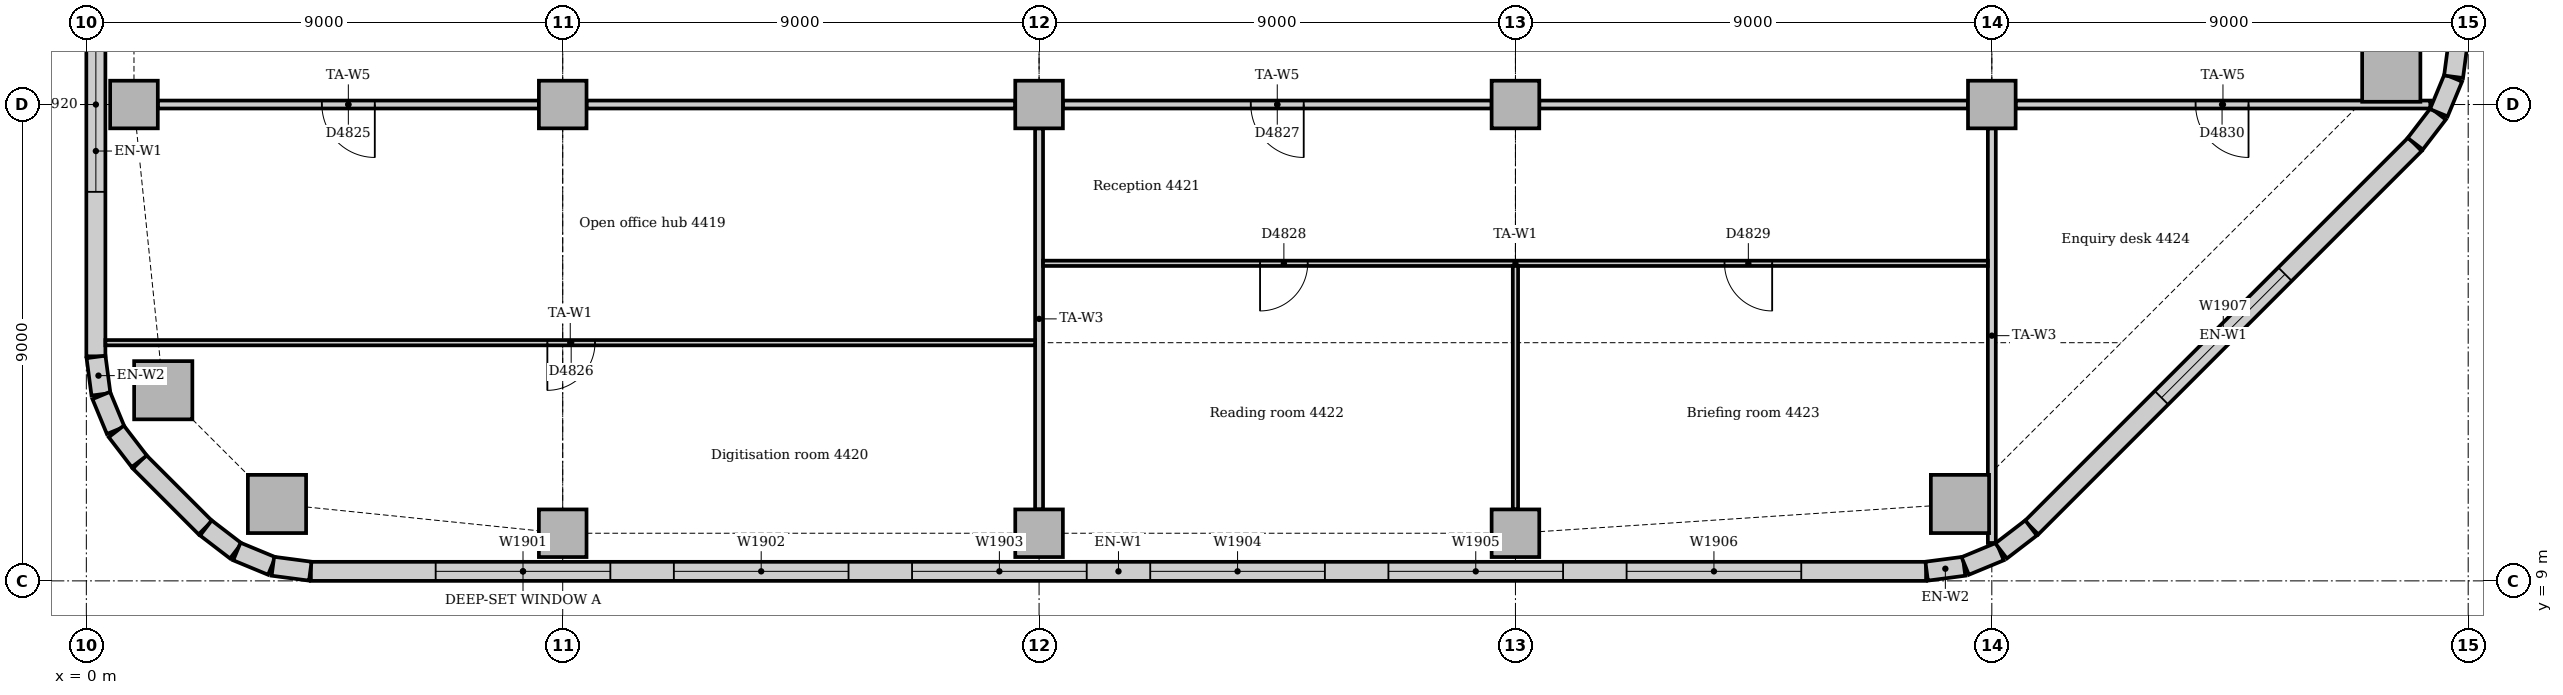
"""IFC4 building model, lengths in metres.
Left out: names, types, materials, properties, quantities, classifications, styles, units other than length and angle.
Written with IfcOpenShell. Run it as: python <this file> out.ifc"""

import sys

from ifc_helpers import new_model, si_unit, direction, frame, frame_2d, origin, origin_2d, place, context, subcontext, project, spatial, rectangle, extrude, element, fill, save


model = new_model("IFC4")
c1 = context("Model", 3, precision=1e-05, world=origin(), true_north=direction((0.0, 1.0)))
c2 = subcontext(c1, "Body", "Model", "MODEL_VIEW")
j1 = project(units=[si_unit("LENGTHUNIT", "METRE"), si_unit("PLANEANGLEUNIT", "RADIAN")], contexts=[c1])
p1 = place(None, origin())
s1 = spatial("IfcSite", under=j1, at=p1, CompositionType="ELEMENT")
p2 = place(p1, origin())
s2 = spatial("IfcBuilding", under=s1, at=p2, CompositionType="ELEMENT")
p3 = place(p2, frame((0.0, 0.0, 185.0)))
s3 = spatial("IfcBuildingStorey", under=s2, at=p3, CompositionType="ELEMENT", Elevation=185.0)
for number, where, z_axis, x_axis in (
    (1, (3.602, 10.453, 0.0), (0.0, 0.0, 1.0), (1.0, 0.0, 0.0)),
    (2, (35.398, 10.453, 0.0), (0.0, 0.0, 1.0), (1.0, 0.0, 0.0)),
    (3, (43.547, 18.602, 0.0), (0.0, 0.0, 1.0), (1.0, 0.0, 0.0)),
    (4, (1.453, 12.602, 0.0), (0.0, 0.0, 1.0), (1.0, 0.0, 0.0)),
):
    element("IfcColumn", number, at=place(p3, frame(where, z_axis=z_axis, x_axis=x_axis)), inside=s3, PredefinedType="COLUMN", context=c2, shape_type="SweptSolid", body=[
        extrude(rectangle(XDim=1.1, YDim=1.1, at=origin_2d()), origin(), (0.0, 0.0, 1.0), 3.85),
    ])
for number, where, z_axis, x_axis in (
    (5, (9.0, 9.9, 0.0), (0.0, 0.0, 1.0), (1.0, 0.0, 0.0)),
    (6, (18.0, 9.9, 0.0), (0.0, 0.0, 1.0), (1.0, 0.0, 0.0)),
    (7, (27.0, 9.9, 0.0), (0.0, 0.0, 1.0), (1.0, 0.0, 0.0)),
    (8, (0.9, 18.0, 0.0), (0.0, 0.0, 1.0), (1.0, 0.0, 0.0)),
    (9, (9.0, 18.0, 0.0), (0.0, 0.0, 1.0), (1.0, 0.0, 0.0)),
    (10, (18.0, 18.0, 0.0), (0.0, 0.0, 1.0), (1.0, 0.0, 0.0)),
    (11, (27.0, 18.0, 0.0), (0.0, 0.0, 1.0), (1.0, 0.0, 0.0)),
    (12, (36.0, 18.0, 0.0), (0.0, 0.0, 1.0), (1.0, 0.0, 0.0)),
):
    element("IfcColumn", number, at=place(p3, frame(where, z_axis=z_axis, x_axis=x_axis)), inside=s3, PredefinedType="COLUMN", context=c2, shape_type="SweptSolid", body=[
        extrude(rectangle(XDim=0.9, YDim=0.9, at=origin_2d()), origin(), (0.0, 0.0, 1.0), 3.85),
    ])
p4 = place(p3, frame((4.243, 9.18, 0.0), z_axis=(0.0, 0.0, 1.0), x_axis=(1.0, 0.0, 0.0)))
e13 = element("IfcWall", 13, at=p4, inside=s3, PredefinedType="STANDARD", context=c2, shape_type="SweptSolid", body=[
    extrude(rectangle(XDim=30.515, YDim=0.36, at=frame_2d((15.257, 0.0))), origin(), (0.0, 0.0, 1.0), 3.85),
])
p5 = place(p4, frame((2.357, 0.0, 0.9)))
e14 = element("IfcOpeningElement", 14, at=p5, cuts=e13, PredefinedType="OPENING", context=c2, shape_type="SweptSolid", body=[
    extrude(rectangle(XDim=3.3, YDim=1.6, at=frame_2d((1.65, 0.8))), frame((0.0, 0.19, 0.0), z_axis=(0.0, -1.0, 0.0), x_axis=(1.0, 0.0, 0.0)), (0.0, 0.0, 1.0), 0.38),
])
p6 = place(p4, frame((6.857, 0.0, 0.9)))
e15 = element("IfcOpeningElement", 15, at=p6, cuts=e13, PredefinedType="OPENING", context=c2, shape_type="SweptSolid", body=[
    extrude(rectangle(XDim=3.3, YDim=1.6, at=frame_2d((1.65, 0.8))), frame((0.0, 0.19, 0.0), z_axis=(0.0, -1.0, 0.0), x_axis=(1.0, 0.0, 0.0)), (0.0, 0.0, 1.0), 0.38),
])
p7 = place(p4, frame((11.357, 0.0, 0.9)))
e16 = element("IfcOpeningElement", 16, at=p7, cuts=e13, PredefinedType="OPENING", context=c2, shape_type="SweptSolid", body=[
    extrude(rectangle(XDim=3.3, YDim=1.6, at=frame_2d((1.65, 0.8))), frame((0.0, 0.19, 0.0), z_axis=(0.0, -1.0, 0.0), x_axis=(1.0, 0.0, 0.0)), (0.0, 0.0, 1.0), 0.38),
])
p8 = place(p4, frame((15.857, 0.0, 0.9)))
e17 = element("IfcOpeningElement", 17, at=p8, cuts=e13, PredefinedType="OPENING", context=c2, shape_type="SweptSolid", body=[
    extrude(rectangle(XDim=3.3, YDim=1.6, at=frame_2d((1.65, 0.8))), frame((0.0, 0.19, 0.0), z_axis=(0.0, -1.0, 0.0), x_axis=(1.0, 0.0, 0.0)), (0.0, 0.0, 1.0), 0.38),
])
p9 = place(p4, frame((20.357, 0.0, 0.9)))
e18 = element("IfcOpeningElement", 18, at=p9, cuts=e13, PredefinedType="OPENING", context=c2, shape_type="SweptSolid", body=[
    extrude(rectangle(XDim=3.3, YDim=1.6, at=frame_2d((1.65, 0.8))), frame((0.0, 0.19, 0.0), z_axis=(0.0, -1.0, 0.0), x_axis=(1.0, 0.0, 0.0)), (0.0, 0.0, 1.0), 0.38),
])
p10 = place(p4, frame((24.857, 0.0, 0.9)))
e19 = element("IfcOpeningElement", 19, at=p10, cuts=e13, PredefinedType="OPENING", context=c2, shape_type="SweptSolid", body=[
    extrude(rectangle(XDim=3.3, YDim=1.6, at=frame_2d((1.65, 0.8))), frame((0.0, 0.19, 0.0), z_axis=(0.0, -1.0, 0.0), x_axis=(1.0, 0.0, 0.0)), (0.0, 0.0, 1.0), 0.38),
])
p11 = place(p3, frame((36.751, 10.006, 0.0), z_axis=(0.0, 0.0, 1.0), x_axis=(0.707106781187, 0.707106781187, 0.0)))
e20 = element("IfcWall", 20, at=p11, inside=s3, PredefinedType="STANDARD", context=c2, shape_type="SweptSolid", body=[
    extrude(rectangle(XDim=10.243, YDim=0.36, at=frame_2d((5.121, 0.0))), origin(), (0.0, 0.0, 1.0), 3.85),
])
p12 = place(p11, frame((3.471, 0.0, 0.9)))
e21 = element("IfcOpeningElement", 21, at=p12, cuts=e20, PredefinedType="OPENING", context=c2, shape_type="SweptSolid", body=[
    extrude(rectangle(XDim=3.3, YDim=1.6, at=frame_2d((1.65, 0.8))), frame((0.0, 0.19, 0.0), z_axis=(0.0, -1.0, 0.0), x_axis=(1.0, 0.0, 0.0)), (0.0, 0.0, 1.0), 0.38),
])
p13 = place(p3, frame((0.18, 21.0, 0.0), z_axis=(0.0, 0.0, 1.0), x_axis=(0.0, -1.0, 0.0)))
e22 = element("IfcWall", 22, at=p13, inside=s3, PredefinedType="STANDARD", context=c2, shape_type="SweptSolid", body=[
    extrude(rectangle(XDim=7.757, YDim=0.36, at=frame_2d((3.879, 0.0))), origin(), (0.0, 0.0, 1.0), 3.85),
])
p14 = place(p13, frame((1.35, 0.0, 0.9)))
e23 = element("IfcOpeningElement", 23, at=p14, cuts=e22, PredefinedType="OPENING", context=c2, shape_type="SweptSolid", body=[
    extrude(rectangle(XDim=3.3, YDim=1.6, at=frame_2d((1.65, 0.8))), frame((0.0, 0.19, 0.0), z_axis=(0.0, -1.0, 0.0), x_axis=(1.0, 0.0, 0.0)), (0.0, 0.0, 1.0), 0.38),
])
p15 = place(p3, frame((1.006, 11.249, 0.0), z_axis=(0.0, 0.0, 1.0), x_axis=(0.707106781187, -0.707106781187, 0.0)))
e24 = element("IfcWall", 24, at=p15, inside=s3, PredefinedType="STANDARD", context=c2, shape_type="SweptSolid", body=[
    extrude(rectangle(XDim=1.757, YDim=0.36, at=frame_2d((0.879, 0.0))), origin(), (0.0, 0.0, 1.0), 3.85),
])
for number, where, z_axis, x_axis in (
    (25, (34.769, 9.183, 0.0), (0.0, 0.0, 1.0), (0.991, 0.131, 0.0)),
    (26, (35.497, 9.282, 0.0), (0.0, 0.0, 1.0), (0.924, 0.383, 0.0)),
):
    element("IfcWall", number, at=place(p3, frame(where, z_axis=z_axis, x_axis=x_axis)), inside=s3, PredefinedType="STANDARD", context=c2, shape_type="SweptSolid", body=[
        extrude(rectangle(XDim=0.713, YDim=0.36, at=frame_2d((0.356, 0.0))), origin(), (0.0, 0.0, 1.0), 3.85),
    ])
for number, where, z_axis, x_axis in (
    (27, (36.175, 9.566, 0.0), (0.0, 0.0, 1.0), (0.793, 0.609, 0.0)),
    (28, (44.0, 17.259, 0.0), (0.0, 0.0, 1.0), (0.609, 0.793, 0.0)),
):
    element("IfcWall", number, at=place(p3, frame(where, z_axis=z_axis, x_axis=x_axis)), inside=s3, PredefinedType="STANDARD", context=c2, shape_type="SweptSolid", body=[
        extrude(rectangle(XDim=0.713, YDim=0.36, at=frame_2d((0.357, 0.0))), origin(), (0.0, 0.0, 1.0), 3.85),
    ])
for number, where, z_axis, x_axis in (
    (29, (44.445, 17.844, 0.0), (0.0, 0.0, 1.0), (0.383, 0.924, 0.0)),
    (30, (44.724, 18.524, 0.0), (0.0, 0.0, 1.0), (0.131, 0.991, 0.0)),
    (31, (0.183, 13.231, 0.0), (0.0, 0.0, 1.0), (0.131, -0.991, 0.0)),
    (32, (0.282, 12.503, 0.0), (0.0, 0.0, 1.0), (0.383, -0.924, 0.0)),
):
    element("IfcWall", number, at=place(p3, frame(where, z_axis=z_axis, x_axis=x_axis)), inside=s3, PredefinedType="STANDARD", context=c2, shape_type="SweptSolid", body=[
        extrude(rectangle(XDim=0.713, YDim=0.36, at=frame_2d((0.356, 0.0))), origin(), (0.0, 0.0, 1.0), 3.85),
    ])
for number, where, z_axis, x_axis in (
    (33, (0.566, 11.825, 0.0), (0.0, 0.0, 1.0), (0.609, -0.793, 0.0)),
    (34, (2.259, 10.0, 0.0), (0.0, 0.0, 1.0), (0.793, -0.609, 0.0)),
):
    element("IfcWall", number, at=place(p3, frame(where, z_axis=z_axis, x_axis=x_axis)), inside=s3, PredefinedType="STANDARD", context=c2, shape_type="SweptSolid", body=[
        extrude(rectangle(XDim=0.713, YDim=0.36, at=frame_2d((0.357, 0.0))), origin(), (0.0, 0.0, 1.0), 3.85),
    ])
for number, where, z_axis, x_axis in (
    (35, (2.844, 9.555, 0.0), (0.0, 0.0, 1.0), (0.924, -0.383, 0.0)),
    (36, (3.524, 9.276, 0.0), (0.0, 0.0, 1.0), (0.991, -0.131, 0.0)),
):
    element("IfcWall", number, at=place(p3, frame(where, z_axis=z_axis, x_axis=x_axis)), inside=s3, PredefinedType="STANDARD", context=c2, shape_type="SweptSolid", body=[
        extrude(rectangle(XDim=0.713, YDim=0.36, at=frame_2d((0.356, 0.0))), origin(), (0.0, 0.0, 1.0), 3.85),
    ])
p16 = place(p3, frame((1.35, 18.0, 0.0), z_axis=(0.0, 0.0, 1.0), x_axis=(1.0, 0.0, 0.0)))
e37 = element("IfcWall", 37, at=p16, inside=s3, PredefinedType="PARTITIONING", context=c2, shape_type="SweptSolid", body=[
    extrude(rectangle(XDim=7.2, YDim=0.15, at=frame_2d((3.6, 0.0))), origin(), (0.0, 0.0, 1.0), 3.262),
])
p17 = place(p16, frame((3.1, 0.0, 0.0)))
e38 = element("IfcOpeningElement", 38, at=p17, cuts=e37, PredefinedType="OPENING", context=c2, shape_type="SweptSolid", body=[
    extrude(rectangle(XDim=1.0, YDim=2.1, at=frame_2d((0.5, 1.05))), frame((0.0, 0.085, 0.0), z_axis=(0.0, -1.0, 0.0), x_axis=(1.0, 0.0, 0.0)), (0.0, 0.0, 1.0), 0.17),
])
p18 = place(p3, frame((9.45, 18.0, 0.0), z_axis=(0.0, 0.0, 1.0), x_axis=(1.0, 0.0, 0.0)))
e39 = element("IfcWall", 39, at=p18, inside=s3, PredefinedType="PARTITIONING", context=c2, shape_type="SweptSolid", body=[
    extrude(rectangle(XDim=8.1, YDim=0.15, at=frame_2d((4.05, 0.0))), origin(), (0.0, 0.0, 1.0), 3.262),
])
p19 = place(p3, frame((18.45, 18.0, 0.0), z_axis=(0.0, 0.0, 1.0), x_axis=(1.0, 0.0, 0.0)))
e40 = element("IfcWall", 40, at=p19, inside=s3, PredefinedType="PARTITIONING", context=c2, shape_type="SweptSolid", body=[
    extrude(rectangle(XDim=8.1, YDim=0.15, at=frame_2d((4.05, 0.0))), origin(), (0.0, 0.0, 1.0), 3.262),
])
p20 = place(p19, frame((3.55, 0.0, 0.0)))
e41 = element("IfcOpeningElement", 41, at=p20, cuts=e40, PredefinedType="OPENING", context=c2, shape_type="SweptSolid", body=[
    extrude(rectangle(XDim=1.0, YDim=2.1, at=frame_2d((0.5, 1.05))), frame((0.0, 0.085, 0.0), z_axis=(0.0, -1.0, 0.0), x_axis=(1.0, 0.0, 0.0)), (0.0, 0.0, 1.0), 0.17),
])
p21 = place(p3, frame((27.45, 18.0, 0.0), z_axis=(0.0, 0.0, 1.0), x_axis=(1.0, 0.0, 0.0)))
e42 = element("IfcWall", 42, at=p21, inside=s3, PredefinedType="PARTITIONING", context=c2, shape_type="SweptSolid", body=[
    extrude(rectangle(XDim=8.1, YDim=0.15, at=frame_2d((4.05, 0.0))), origin(), (0.0, 0.0, 1.0), 3.262),
])
p22 = place(p3, frame((36.45, 18.0, 0.0), z_axis=(0.0, 0.0, 1.0), x_axis=(1.0, 0.0, 0.0)))
e43 = element("IfcWall", 43, at=p22, inside=s3, PredefinedType="PARTITIONING", context=c2, shape_type="SweptSolid", body=[
    extrude(rectangle(XDim=7.834, YDim=0.15, at=frame_2d((3.917, 0.0))), origin(), (0.0, 0.0, 1.0), 3.35),
])
p23 = place(p22, frame((3.4, 0.0, 0.0)))
e44 = element("IfcOpeningElement", 44, at=p23, cuts=e43, PredefinedType="OPENING", context=c2, shape_type="SweptSolid", body=[
    extrude(rectangle(XDim=1.0, YDim=2.1, at=frame_2d((0.5, 1.05))), frame((0.0, 0.085, 0.0), z_axis=(0.0, -1.0, 0.0), x_axis=(1.0, 0.0, 0.0)), (0.0, 0.0, 1.0), 0.17),
])
p24 = place(p3, frame((18.0, 10.35, 0.0), z_axis=(0.0, 0.0, 1.0), x_axis=(0.0, 1.0, 0.0)))
e45 = element("IfcWall", 45, at=p24, inside=s3, PredefinedType="PARTITIONING", context=c2, shape_type="SweptSolid", body=[
    extrude(rectangle(XDim=7.2, YDim=0.15, at=frame_2d((3.6, 0.0))), origin(), (0.0, 0.0, 1.0), 3.362),
])
p25 = place(p3, frame((36.0, 9.716, 0.0), z_axis=(0.0, 0.0, 1.0), x_axis=(0.0, 1.0, 0.0)))
e46 = element("IfcWall", 46, at=p25, inside=s3, PredefinedType="PARTITIONING", context=c2, shape_type="SweptSolid", body=[
    extrude(rectangle(XDim=7.834, YDim=0.15, at=frame_2d((3.917, 0.0))), origin(), (0.0, 0.0, 1.0), 3.35),
])
p26 = place(p3, frame((18.075, 15.0, 0.0), z_axis=(0.0, 0.0, 1.0), x_axis=(1.0, 0.0, 0.0)))
e47 = element("IfcWall", 47, at=p26, inside=s3, PredefinedType="PARTITIONING", context=c2, shape_type="SweptSolid", body=[
    extrude(rectangle(XDim=17.85, YDim=0.1, at=frame_2d((8.925, 0.0))), origin(), (0.0, 0.0, 1.0), 3.85),
])
p27 = place(p26, frame((4.1, 0.0, 0.0)))
e48 = element("IfcOpeningElement", 48, at=p27, cuts=e47, PredefinedType="OPENING", context=c2, shape_type="SweptSolid", body=[
    extrude(rectangle(XDim=0.9, YDim=2.1, at=frame_2d((0.45, 1.05))), frame((0.0, 0.06, 0.0), z_axis=(0.0, -1.0, 0.0), x_axis=(1.0, 0.0, 0.0)), (0.0, 0.0, 1.0), 0.12),
])
p28 = place(p26, frame((12.875, 0.0, 0.0)))
e49 = element("IfcOpeningElement", 49, at=p28, cuts=e47, PredefinedType="OPENING", context=c2, shape_type="SweptSolid", body=[
    extrude(rectangle(XDim=0.9, YDim=2.1, at=frame_2d((0.45, 1.05))), frame((0.0, 0.06, 0.0), z_axis=(0.0, -1.0, 0.0), x_axis=(1.0, 0.0, 0.0)), (0.0, 0.0, 1.0), 0.12),
])
p29 = place(p3, frame((0.36, 13.5, 0.0), z_axis=(0.0, 0.0, 1.0), x_axis=(1.0, 0.0, 0.0)))
e50 = element("IfcWall", 50, at=p29, inside=s3, PredefinedType="PARTITIONING", context=c2, shape_type="SweptSolid", body=[
    extrude(rectangle(XDim=17.565, YDim=0.1, at=frame_2d((8.783, 0.0))), origin(), (0.0, 0.0, 1.0), 3.4),
])
p30 = place(p29, frame((8.35, 0.0, 0.0)))
e51 = element("IfcOpeningElement", 51, at=p30, cuts=e50, PredefinedType="OPENING", context=c2, shape_type="SweptSolid", body=[
    extrude(rectangle(XDim=0.9, YDim=2.1, at=frame_2d((0.45, 1.05))), frame((0.0, 0.06, 0.0), z_axis=(0.0, -1.0, 0.0), x_axis=(1.0, 0.0, 0.0)), (0.0, 0.0, 1.0), 0.12),
])
p31 = place(p3, frame((27.0, 10.35, 0.0), z_axis=(0.0, 0.0, 1.0), x_axis=(0.0, 1.0, 0.0)))
e52 = element("IfcWall", 52, at=p31, inside=s3, PredefinedType="PARTITIONING", context=c2, shape_type="SweptSolid", body=[
    extrude(rectangle(XDim=4.6, YDim=0.1, at=frame_2d((2.3, 0.0))), origin(), (0.0, 0.0, 1.0), 3.362),
])
p32 = place(p5, origin())
e53 = element("IfcWindow", 53, at=p32, inside=s3, PartitioningType="SINGLE_PANEL", PredefinedType="WINDOW", context=c2, shape_type="SweptSolid", body=[
    extrude(rectangle(XDim=3.3, YDim=1.6, at=frame_2d((1.65, 0.8))), frame((0.0, 0.13, 0.0), z_axis=(0.0, -1.0, 0.0), x_axis=(1.0, 0.0, 0.0)), (0.0, 0.0, 1.0), 0.06),
])
fill(e14, e53)
p33 = place(p6, origin())
e54 = element("IfcWindow", 54, at=p33, inside=s3, PartitioningType="SINGLE_PANEL", PredefinedType="WINDOW", context=c2, shape_type="SweptSolid", body=[
    extrude(rectangle(XDim=3.3, YDim=1.6, at=frame_2d((1.65, 0.8))), frame((0.0, 0.13, 0.0), z_axis=(0.0, -1.0, 0.0), x_axis=(1.0, 0.0, 0.0)), (0.0, 0.0, 1.0), 0.06),
])
fill(e15, e54)
p34 = place(p7, origin())
e55 = element("IfcWindow", 55, at=p34, inside=s3, PartitioningType="SINGLE_PANEL", PredefinedType="WINDOW", context=c2, shape_type="SweptSolid", body=[
    extrude(rectangle(XDim=3.3, YDim=1.6, at=frame_2d((1.65, 0.8))), frame((0.0, 0.13, 0.0), z_axis=(0.0, -1.0, 0.0), x_axis=(1.0, 0.0, 0.0)), (0.0, 0.0, 1.0), 0.06),
])
fill(e16, e55)
p35 = place(p8, origin())
e56 = element("IfcWindow", 56, at=p35, inside=s3, PartitioningType="SINGLE_PANEL", PredefinedType="WINDOW", context=c2, shape_type="SweptSolid", body=[
    extrude(rectangle(XDim=3.3, YDim=1.6, at=frame_2d((1.65, 0.8))), frame((0.0, 0.13, 0.0), z_axis=(0.0, -1.0, 0.0), x_axis=(1.0, 0.0, 0.0)), (0.0, 0.0, 1.0), 0.06),
])
fill(e17, e56)
p36 = place(p9, origin())
e57 = element("IfcWindow", 57, at=p36, inside=s3, PartitioningType="SINGLE_PANEL", PredefinedType="WINDOW", context=c2, shape_type="SweptSolid", body=[
    extrude(rectangle(XDim=3.3, YDim=1.6, at=frame_2d((1.65, 0.8))), frame((0.0, 0.13, 0.0), z_axis=(0.0, -1.0, 0.0), x_axis=(1.0, 0.0, 0.0)), (0.0, 0.0, 1.0), 0.06),
])
fill(e18, e57)
p37 = place(p10, origin())
e58 = element("IfcWindow", 58, at=p37, inside=s3, PartitioningType="SINGLE_PANEL", PredefinedType="WINDOW", context=c2, shape_type="SweptSolid", body=[
    extrude(rectangle(XDim=3.3, YDim=1.6, at=frame_2d((1.65, 0.8))), frame((0.0, 0.13, 0.0), z_axis=(0.0, -1.0, 0.0), x_axis=(1.0, 0.0, 0.0)), (0.0, 0.0, 1.0), 0.06),
])
fill(e19, e58)
p38 = place(p12, origin())
e59 = element("IfcWindow", 59, at=p38, inside=s3, PartitioningType="SINGLE_PANEL", PredefinedType="WINDOW", context=c2, shape_type="SweptSolid", body=[
    extrude(rectangle(XDim=3.3, YDim=1.6, at=frame_2d((1.65, 0.8))), frame((0.0, 0.13, 0.0), z_axis=(0.0, -1.0, 0.0), x_axis=(1.0, 0.0, 0.0)), (0.0, 0.0, 1.0), 0.06),
])
fill(e21, e59)
p39 = place(p14, origin())
e60 = element("IfcWindow", 60, at=p39, inside=s3, PartitioningType="SINGLE_PANEL", PredefinedType="WINDOW", context=c2, shape_type="SweptSolid", body=[
    extrude(rectangle(XDim=3.3, YDim=1.6, at=frame_2d((1.65, 0.8))), frame((0.0, 0.13, 0.0), z_axis=(0.0, -1.0, 0.0), x_axis=(1.0, 0.0, 0.0)), (0.0, 0.0, 1.0), 0.06),
])
fill(e23, e60)
p40 = place(p17, frame((1.0, 0.0, 0.0), z_axis=(0.0, 0.0, 1.0), x_axis=(-1.0, 0.0, 0.0)))
e61 = element("IfcDoor", 61, at=p40, inside=s3, OperationType="SINGLE_SWING_LEFT", PredefinedType="DOOR", context=c2, shape_type="SweptSolid", body=[
    extrude(rectangle(XDim=1.0, YDim=2.1, at=frame_2d((0.5, 1.05))), frame((0.0, 0.025, 0.0), z_axis=(0.0, -1.0, 0.0), x_axis=(1.0, 0.0, 0.0)), (0.0, 0.0, 1.0), 0.05),
])
fill(e38, e61)
p41 = place(p30, frame((0.9, 0.0, 0.0), z_axis=(0.0, 0.0, 1.0), x_axis=(-1.0, 0.0, 0.0)))
e62 = element("IfcDoor", 62, at=p41, inside=s3, OperationType="SINGLE_SWING_RIGHT", PredefinedType="DOOR", context=c2, shape_type="SweptSolid", body=[
    extrude(rectangle(XDim=0.9, YDim=2.1, at=frame_2d((0.45, 1.05))), frame((0.0, 0.025, 0.0), z_axis=(0.0, -1.0, 0.0), x_axis=(1.0, 0.0, 0.0)), (0.0, 0.0, 1.0), 0.05),
])
fill(e51, e62)
p42 = place(p20, frame((1.0, 0.0, 0.0), z_axis=(0.0, 0.0, 1.0), x_axis=(-1.0, 0.0, 0.0)))
e63 = element("IfcDoor", 63, at=p42, inside=s3, OperationType="SINGLE_SWING_LEFT", PredefinedType="DOOR", context=c2, shape_type="SweptSolid", body=[
    extrude(rectangle(XDim=1.0, YDim=2.1, at=frame_2d((0.5, 1.05))), frame((0.0, 0.025, 0.0), z_axis=(0.0, -1.0, 0.0), x_axis=(1.0, 0.0, 0.0)), (0.0, 0.0, 1.0), 0.05),
])
fill(e41, e63)
p43 = place(p27, frame((0.9, 0.0, 0.0), z_axis=(0.0, 0.0, 1.0), x_axis=(-1.0, 0.0, 0.0)))
e64 = element("IfcDoor", 64, at=p43, inside=s3, OperationType="SINGLE_SWING_RIGHT", PredefinedType="DOOR", context=c2, shape_type="SweptSolid", body=[
    extrude(rectangle(XDim=0.9, YDim=2.1, at=frame_2d((0.45, 1.05))), frame((0.0, 0.025, 0.0), z_axis=(0.0, -1.0, 0.0), x_axis=(1.0, 0.0, 0.0)), (0.0, 0.0, 1.0), 0.05),
])
fill(e48, e64)
p44 = place(p28, frame((0.9, 0.0, 0.0), z_axis=(0.0, 0.0, 1.0), x_axis=(-1.0, 0.0, 0.0)))
e65 = element("IfcDoor", 65, at=p44, inside=s3, OperationType="SINGLE_SWING_LEFT", PredefinedType="DOOR", context=c2, shape_type="SweptSolid", body=[
    extrude(rectangle(XDim=0.9, YDim=2.1, at=frame_2d((0.45, 1.05))), frame((0.0, 0.025, 0.0), z_axis=(0.0, -1.0, 0.0), x_axis=(1.0, 0.0, 0.0)), (0.0, 0.0, 1.0), 0.05),
])
fill(e49, e65)
p45 = place(p23, frame((1.0, 0.0, 0.0), z_axis=(0.0, 0.0, 1.0), x_axis=(-1.0, 0.0, 0.0)))
e66 = element("IfcDoor", 66, at=p45, inside=s3, OperationType="SINGLE_SWING_LEFT", PredefinedType="DOOR", context=c2, shape_type="SweptSolid", body=[
    extrude(rectangle(XDim=1.0, YDim=2.1, at=frame_2d((0.5, 1.05))), frame((0.0, 0.025, 0.0), z_axis=(0.0, -1.0, 0.0), x_axis=(1.0, 0.0, 0.0)), (0.0, 0.0, 1.0), 0.05),
])
fill(e44, e66)
save(model, sys.argv[1])
